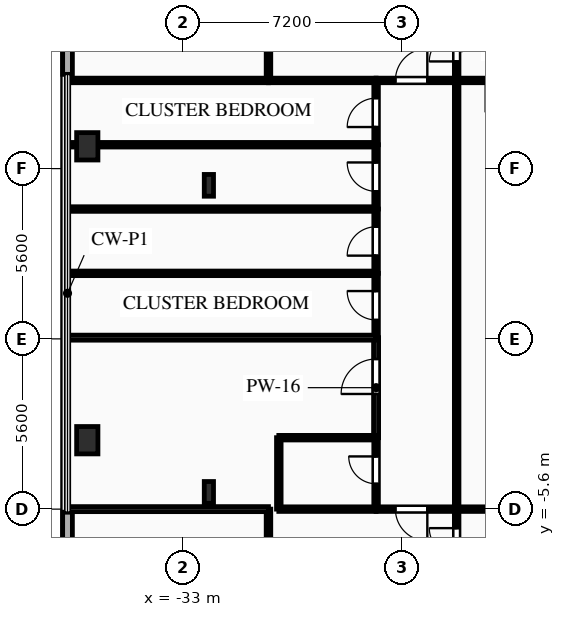
"""IFC4 building model, lengths in metres.
Left out: names, types, materials, properties, quantities, classifications, styles, units other than length and angle.
Written with IfcOpenShell. Run it as: python <this file> out.ifc"""

import sys

from ifc_helpers import new_model, si_unit, direction, frame, frame_2d, origin, origin_2d, place, context, subcontext, project, spatial, rectangle, i_section, extrude, element, fill, save


model = new_model("IFC4")
c1 = context("Model", 3, precision=1e-05, world=origin(), true_north=direction((0.0, 1.0)))
c2 = subcontext(c1, "Body", "Model", "MODEL_VIEW")
j1 = project(units=[si_unit("LENGTHUNIT", "METRE"), si_unit("PLANEANGLEUNIT", "RADIAN")], contexts=[c1])
p1 = place(None, origin())
s1 = spatial("IfcSite", under=j1, at=p1, CompositionType="ELEMENT")
p2 = place(p1, origin())
s2 = spatial("IfcBuilding", under=s1, at=p2, CompositionType="ELEMENT")
p3 = place(p2, frame((0.0, 0.0, 18.0)))
s3 = spatial("IfcBuildingStorey", under=s2, at=p3, CompositionType="ELEMENT", Elevation=18.0)
for number, where, z_axis, x_axis in (
    (1, (-36.15, -3.333, 0.0), (0.0, 0.0, 1.0), (1.0, 0.0, 0.0)),
    (2, (-36.15, 6.333, 0.0), (0.0, 0.0, 1.0), (1.0, 0.0, 0.0)),
):
    element("IfcColumn", number, at=place(p3, frame(where, z_axis=z_axis, x_axis=x_axis)), inside=s3, PredefinedType="COLUMN", context=c2, shape_type="SweptSolid", body=[
        extrude(rectangle(XDim=0.7, YDim=0.9, at=origin_2d()), origin(), (0.0, 0.0, 1.0), 4.5),
    ])
for number, where, z_axis, x_axis in (
    (3, (-32.15, 5.05, 0.0), (0.0, 0.0, 1.0), (1.0, 0.0, 0.0)),
    (4, (-32.15, -5.05, 0.0), (0.0, 0.0, 1.0), (1.0, 0.0, 0.0)),
):
    element("IfcColumn", number, at=place(p3, frame(where, z_axis=z_axis, x_axis=x_axis)), inside=s3, PredefinedType="COLUMN", context=c2, shape_type="SweptSolid", body=[
        extrude(i_section(OverallWidth=0.304, OverallDepth=0.716, WebThickness=0.021, FlangeThickness=0.04, FilletRadius=0.027, at=origin_2d()), origin(), (0.0, 0.0, 1.0), 4.5),
    ])
p4 = place(p3, frame((-36.8, -21.8, 0.0), z_axis=(0.0, 0.0, 1.0), x_axis=(0.0, 1.0, 0.0)))
e5 = element("IfcWall", 5, at=p4, inside=s3, PredefinedType="SOLIDWALL", context=c2, shape_type="SweptSolid", body=[
    extrude(rectangle(XDim=16.1, YDim=0.32, at=frame_2d((8.05, 0.0))), origin(), (0.0, 0.0, 1.0), 4.17),
])
p5 = place(p4, frame((5.067, 0.0, 0.85)))
e6 = element("IfcOpeningElement", 6, at=p5, cuts=e5, PredefinedType="OPENING", context=c2, shape_type="SweptSolid", body=[
    extrude(rectangle(XDim=2.6, YDim=2.4, at=frame_2d((1.3, 1.2))), frame((0.0, 0.17, 0.0), z_axis=(0.0, -1.0, 0.0), x_axis=(1.0, 0.0, 0.0)), (0.0, 0.0, 1.0), 0.34),
])
p6 = place(p3, frame((-36.8, 8.7, 0.0), z_axis=(0.0, 0.0, 1.0), x_axis=(0.0, 1.0, 0.0)))
e7 = element("IfcWall", 7, at=p6, inside=s3, PredefinedType="SOLIDWALL", context=c2, shape_type="SweptSolid", body=[
    extrude(rectangle(XDim=16.1, YDim=0.32, at=frame_2d((8.05, 0.0))), origin(), (0.0, 0.0, 1.0), 4.17),
])
p7 = place(p6, frame((8.485, 0.0, 0.85)))
e8 = element("IfcOpeningElement", 8, at=p7, cuts=e7, PredefinedType="OPENING", context=c2, shape_type="SweptSolid", body=[
    extrude(rectangle(XDim=2.6, YDim=2.4, at=frame_2d((1.3, 1.2))), frame((0.0, 0.17, 0.0), z_axis=(0.0, -1.0, 0.0), x_axis=(1.0, 0.0, 0.0)), (0.0, 0.0, 1.0), 0.34),
])
p8 = place(p3, frame((-24.0, 8.5, 0.0), z_axis=(0.0, 0.0, 1.0), x_axis=(0.0, 1.0, 0.0)))
e9 = element("IfcWall", 9, at=p8, inside=s3, PredefinedType="PARTITIONING", context=c2, shape_type="SweptSolid", body=[
    extrude(rectangle(XDim=2.15, YDim=0.15, at=frame_2d((1.075, 0.0))), origin(), (0.0, 0.0, 1.0), 4.17),
])
p9 = place(p8, frame((0.625, 0.0, 0.0)))
e10 = element("IfcOpeningElement", 10, at=p9, cuts=e9, PredefinedType="OPENING", context=c2, shape_type="SweptSolid", body=[
    extrude(rectangle(XDim=0.9, YDim=2.1, at=frame_2d((0.45, 1.05))), frame((0.0, 0.085, 0.0), z_axis=(0.0, -1.0, 0.0), x_axis=(1.0, 0.0, 0.0)), (0.0, 0.0, 1.0), 0.17),
])
p10 = place(p3, frame((-18.8, 8.5, 0.0), z_axis=(0.0, 0.0, 1.0), x_axis=(-1.0, 0.0, 0.0)))
e11 = element("IfcWall", 11, at=p10, inside=s3, PredefinedType="PARTITIONING", context=c2, shape_type="SweptSolid", body=[
    extrude(rectangle(XDim=5.2, YDim=0.15, at=frame_2d((2.6, 0.0))), origin(), (0.0, 0.0, 1.0), 4.17),
])
p11 = place(p10, frame((3.196, 0.0, 0.0)))
e12 = element("IfcOpeningElement", 12, at=p11, cuts=e11, PredefinedType="OPENING", context=c2, shape_type="SweptSolid", body=[
    extrude(rectangle(XDim=1.05, YDim=2.15, at=frame_2d((0.525, 1.075))), frame((0.0, 0.085, 0.0), z_axis=(0.0, -1.0, 0.0), x_axis=(1.0, 0.0, 0.0)), (0.0, 0.0, 1.0), 0.17),
])
p12 = place(p3, frame((-24.0, -7.75, 0.0), z_axis=(0.0, 0.0, 1.0), x_axis=(0.0, 1.0, 0.0)))
e13 = element("IfcWall", 13, at=p12, inside=s3, PredefinedType="PARTITIONING", context=c2, shape_type="SweptSolid", body=[
    extrude(rectangle(XDim=2.15, YDim=0.15, at=frame_2d((1.075, 0.0))), origin(), (0.0, 0.0, 1.0), 4.17),
])
p13 = place(p12, frame((0.625, 0.0, 0.0)))
e14 = element("IfcOpeningElement", 14, at=p13, cuts=e13, PredefinedType="OPENING", context=c2, shape_type="SweptSolid", body=[
    extrude(rectangle(XDim=0.9, YDim=2.1, at=frame_2d((0.45, 1.05))), frame((0.0, 0.085, 0.0), z_axis=(0.0, -1.0, 0.0), x_axis=(1.0, 0.0, 0.0)), (0.0, 0.0, 1.0), 0.17),
])
p14 = place(p3, frame((-24.0, -5.6, 0.0), z_axis=(0.0, 0.0, 1.0), x_axis=(1.0, 0.0, 0.0)))
e15 = element("IfcWall", 15, at=p14, inside=s3, PredefinedType="PARTITIONING", context=c2, shape_type="SweptSolid", body=[
    extrude(rectangle(XDim=5.2, YDim=0.15, at=frame_2d((2.6, 0.0))), origin(), (0.0, 0.0, 1.0), 4.17),
])
p15 = place(p3, frame((-26.65, 8.5, 0.0), z_axis=(0.0, 0.0, 1.0), x_axis=(1.0, 0.0, 0.0)))
e16 = element("IfcWall", 16, at=p15, inside=s3, PredefinedType="PARTITIONING", context=c2, shape_type="SweptSolid", body=[
    extrude(rectangle(XDim=2.65, YDim=0.15, at=frame_2d((1.325, 0.0))), origin(), (0.0, 0.0, 1.0), 4.17),
])
p16 = place(p15, frame((0.635, 0.0, 0.0)))
e17 = element("IfcOpeningElement", 17, at=p16, cuts=e16, PredefinedType="OPENING", context=c2, shape_type="SweptSolid", body=[
    extrude(rectangle(XDim=1.05, YDim=2.15, at=frame_2d((0.525, 1.075))), frame((0.0, 0.085, 0.0), z_axis=(0.0, -1.0, 0.0), x_axis=(1.0, 0.0, 0.0)), (0.0, 0.0, 1.0), 0.17),
])
p17 = place(p3, frame((-24.0, -5.6, 0.0), z_axis=(0.0, 0.0, 1.0), x_axis=(-1.0, 0.0, 0.0)))
e18 = element("IfcWall", 18, at=p17, inside=s3, PredefinedType="PARTITIONING", context=c2, shape_type="SweptSolid", body=[
    extrude(rectangle(XDim=2.65, YDim=0.15, at=frame_2d((1.325, 0.0))), origin(), (0.0, 0.0, 1.0), 4.17),
])
p18 = place(p17, frame((0.965, 0.0, 0.0)))
e19 = element("IfcOpeningElement", 19, at=p18, cuts=e18, PredefinedType="OPENING", context=c2, shape_type="SweptSolid", body=[
    extrude(rectangle(XDim=1.05, YDim=2.15, at=frame_2d((0.525, 1.075))), frame((0.0, 0.085, 0.0), z_axis=(0.0, -1.0, 0.0), x_axis=(1.0, 0.0, 0.0)), (0.0, 0.0, 1.0), 0.17),
])
p19 = place(p3, frame((-26.65, -5.6, 0.0), z_axis=(0.0, 0.0, 1.0), x_axis=(0.0, 1.0, 0.0)))
e20 = element("IfcWall", 20, at=p19, inside=s3, PredefinedType="PLUMBINGWALL", context=c2, shape_type="SweptSolid", body=[
    extrude(rectangle(XDim=2.35, YDim=0.15, at=frame_2d((1.175, 0.0))), origin(), (0.0, 0.0, 1.0), 4.17),
])
p20 = place(p19, frame((0.834, 0.0, 0.0)))
e21 = element("IfcOpeningElement", 21, at=p20, cuts=e20, PredefinedType="OPENING", context=c2, shape_type="SweptSolid", body=[
    extrude(rectangle(XDim=0.9, YDim=2.1, at=frame_2d((0.45, 1.05))), frame((0.0, 0.085, 0.0), z_axis=(0.0, -1.0, 0.0), x_axis=(1.0, 0.0, 0.0)), (0.0, 0.0, 1.0), 0.17),
])
p21 = place(p3, frame((-26.65, -3.25, 0.0), z_axis=(0.0, 0.0, 1.0), x_axis=(0.0, 1.0, 0.0)))
e22 = element("IfcWall", 22, at=p21, inside=s3, PredefinedType="PARTITIONING", context=c2, shape_type="SweptSolid", body=[
    extrude(rectangle(XDim=3.29, YDim=0.165, at=frame_2d((1.645, 0.0))), origin(), (0.0, 0.0, 1.0), 4.17),
])
p22 = place(p21, frame((1.438, 0.0, 0.0)))
e23 = element("IfcOpeningElement", 23, at=p22, cuts=e22, PredefinedType="OPENING", context=c2, shape_type="SweptSolid", body=[
    extrude(rectangle(XDim=1.15, YDim=2.15, at=frame_2d((0.575, 1.075))), frame((0.0, 0.093, 0.0), z_axis=(0.0, -1.0, 0.0), x_axis=(1.0, 0.0, 0.0)), (0.0, 0.0, 1.0), 0.185),
])
p23 = place(p3, frame((-26.65, 0.04, 0.0), z_axis=(0.0, 0.0, 1.0), x_axis=(0.0, 1.0, 0.0)))
e24 = element("IfcWall", 24, at=p23, inside=s3, PredefinedType="PARTITIONING", context=c2, shape_type="SweptSolid", body=[
    extrude(rectangle(XDim=2.115, YDim=0.15, at=frame_2d((1.058, 0.0))), origin(), (0.0, 0.0, 1.0), 4.17),
])
p24 = place(p23, frame((0.583, 0.0, 0.0)))
e25 = element("IfcOpeningElement", 25, at=p24, cuts=e24, PredefinedType="OPENING", context=c2, shape_type="SweptSolid", body=[
    extrude(rectangle(XDim=0.95, YDim=2.1, at=frame_2d((0.475, 1.05))), frame((0.0, 0.085, 0.0), z_axis=(0.0, -1.0, 0.0), x_axis=(1.0, 0.0, 0.0)), (0.0, 0.0, 1.0), 0.17),
])
p25 = place(p3, frame((-26.65, 2.155, 0.0), z_axis=(0.0, 0.0, 1.0), x_axis=(0.0, 1.0, 0.0)))
e26 = element("IfcWall", 26, at=p25, inside=s3, PredefinedType="PARTITIONING", context=c2, shape_type="SweptSolid", body=[
    extrude(rectangle(XDim=2.115, YDim=0.15, at=frame_2d((1.058, 0.0))), origin(), (0.0, 0.0, 1.0), 4.17),
])
p26 = place(p25, frame((0.583, 0.0, 0.0)))
e27 = element("IfcOpeningElement", 27, at=p26, cuts=e26, PredefinedType="OPENING", context=c2, shape_type="SweptSolid", body=[
    extrude(rectangle(XDim=0.95, YDim=2.1, at=frame_2d((0.475, 1.05))), frame((0.0, 0.085, 0.0), z_axis=(0.0, -1.0, 0.0), x_axis=(1.0, 0.0, 0.0)), (0.0, 0.0, 1.0), 0.17),
])
p27 = place(p3, frame((-26.65, 4.27, 0.0), z_axis=(0.0, 0.0, 1.0), x_axis=(0.0, 1.0, 0.0)))
e28 = element("IfcWall", 28, at=p27, inside=s3, PredefinedType="PARTITIONING", context=c2, shape_type="SweptSolid", body=[
    extrude(rectangle(XDim=2.115, YDim=0.15, at=frame_2d((1.058, 0.0))), origin(), (0.0, 0.0, 1.0), 4.17),
])
p28 = place(p27, frame((0.583, 0.0, 0.0)))
e29 = element("IfcOpeningElement", 29, at=p28, cuts=e28, PredefinedType="OPENING", context=c2, shape_type="SweptSolid", body=[
    extrude(rectangle(XDim=0.95, YDim=2.1, at=frame_2d((0.475, 1.05))), frame((0.0, 0.085, 0.0), z_axis=(0.0, -1.0, 0.0), x_axis=(1.0, 0.0, 0.0)), (0.0, 0.0, 1.0), 0.17),
])
p29 = place(p3, frame((-26.65, 6.385, 0.0), z_axis=(0.0, 0.0, 1.0), x_axis=(0.0, 1.0, 0.0)))
e30 = element("IfcWall", 30, at=p29, inside=s3, PredefinedType="PARTITIONING", context=c2, shape_type="SweptSolid", body=[
    extrude(rectangle(XDim=2.115, YDim=0.15, at=frame_2d((1.058, 0.0))), origin(), (0.0, 0.0, 1.0), 4.17),
])
p30 = place(p29, frame((0.583, 0.0, 0.0)))
e31 = element("IfcOpeningElement", 31, at=p30, cuts=e30, PredefinedType="OPENING", context=c2, shape_type="SweptSolid", body=[
    extrude(rectangle(XDim=0.95, YDim=2.1, at=frame_2d((0.475, 1.05))), frame((0.0, 0.085, 0.0), z_axis=(0.0, -1.0, 0.0), x_axis=(1.0, 0.0, 0.0)), (0.0, 0.0, 1.0), 0.17),
])
p31 = place(p3, frame((-24.0, 8.5, 0.0), z_axis=(0.0, 0.0, 1.0), x_axis=(0.0, -1.0, 0.0)))
e32 = element("IfcWall", 32, at=p31, inside=s3, PredefinedType="PARTITIONING", context=c2, shape_type="SweptSolid", body=[
    extrude(rectangle(XDim=14.1, YDim=0.15, at=frame_2d((7.05, 0.0))), origin(), (0.0, 0.0, 1.0), 4.17),
])
p32 = place(p3, frame((-30.19, 8.5, 0.0), z_axis=(0.0, 0.0, 1.0), x_axis=(0.0, 1.0, 0.0)))
e33 = element("IfcWall", 33, at=p32, inside=s3, PredefinedType="PARTITIONING", context=c2, shape_type="SweptSolid", body=[
    extrude(rectangle(XDim=16.3, YDim=0.15, at=frame_2d((8.15, 0.0))), origin(), (0.0, 0.0, 1.0), 4.17),
])
p33 = place(p32, frame((2.341, 0.0, 0.0)))
e34 = element("IfcOpeningElement", 34, at=p33, cuts=e33, PredefinedType="OPENING", context=c2, shape_type="SweptSolid", body=[
    extrude(rectangle(XDim=1.05, YDim=2.15, at=frame_2d((0.525, 1.075))), frame((0.0, 0.085, 0.0), z_axis=(0.0, -1.0, 0.0), x_axis=(1.0, 0.0, 0.0)), (0.0, 0.0, 1.0), 0.17),
])
p34 = place(p3, frame((-26.65, 8.5, 0.0), z_axis=(0.0, 0.0, 1.0), x_axis=(-1.0, 0.0, 0.0)))
e35 = element("IfcWall", 35, at=p34, inside=s3, PredefinedType="PARTITIONING", context=c2, shape_type="SweptSolid", body=[
    extrude(rectangle(XDim=3.54, YDim=0.15, at=frame_2d((1.77, 0.0))), origin(), (0.0, 0.0, 1.0), 4.17),
])
p35 = place(p3, frame((-30.19, 8.5, 0.0), z_axis=(0.0, 0.0, 1.0), x_axis=(-1.0, 0.0, 0.0)))
e36 = element("IfcWall", 36, at=p35, inside=s3, PredefinedType="PARTITIONING", context=c2, shape_type="SweptSolid", body=[
    extrude(rectangle(XDim=6.61, YDim=0.15, at=frame_2d((3.305, 0.0))), origin(), (0.0, 0.0, 1.0), 4.17),
])
p36 = place(p3, frame((-30.19, -21.8, 0.0), z_axis=(0.0, 0.0, 1.0), x_axis=(0.0, 1.0, 0.0)))
e37 = element("IfcWall", 37, at=p36, inside=s3, PredefinedType="PARTITIONING", context=c2, shape_type="SweptSolid", body=[
    extrude(rectangle(XDim=16.2, YDim=0.15, at=frame_2d((8.1, 0.0))), origin(), (0.0, 0.0, 1.0), 4.17),
])
p37 = place(p36, frame((11.073, 0.0, 0.0)))
e38 = element("IfcOpeningElement", 38, at=p37, cuts=e37, PredefinedType="OPENING", context=c2, shape_type="SweptSolid", body=[
    extrude(rectangle(XDim=1.05, YDim=2.15, at=frame_2d((0.525, 1.075))), frame((0.0, 0.085, 0.0), z_axis=(0.0, -1.0, 0.0), x_axis=(1.0, 0.0, 0.0)), (0.0, 0.0, 1.0), 0.17),
])
p38 = place(p3, frame((-29.85, -5.6, 0.0), z_axis=(0.0, 0.0, 1.0), x_axis=(1.0, 0.0, 0.0)))
e39 = element("IfcWall", 39, at=p38, inside=s3, PredefinedType="PLUMBINGWALL", context=c2, shape_type="SweptSolid", body=[
    extrude(rectangle(XDim=3.2, YDim=0.15, at=frame_2d((1.6, 0.0))), origin(), (0.0, 0.0, 1.0), 4.17),
])
p39 = place(p3, frame((-36.8, -5.6, 0.0), z_axis=(0.0, 0.0, 1.0), x_axis=(1.0, 0.0, 0.0)))
e40 = element("IfcWall", 40, at=p39, inside=s3, PredefinedType="PARTITIONING", context=c2, shape_type="SweptSolid", body=[
    extrude(rectangle(XDim=6.61, YDim=0.165, at=frame_2d((3.305, 0.0))), origin(), (0.0, 0.0, 1.0), 4.17),
])
p40 = place(p3, frame((-29.85, -3.25, 0.0), z_axis=(0.0, 0.0, 1.0), x_axis=(1.0, 0.0, 0.0)))
e41 = element("IfcWall", 41, at=p40, inside=s3, PredefinedType="PLUMBINGWALL", context=c2, shape_type="SweptSolid", body=[
    extrude(rectangle(XDim=3.2, YDim=0.15, at=frame_2d((1.6, 0.0))), origin(), (0.0, 0.0, 1.0), 4.17),
])
p41 = place(p3, frame((-29.85, -5.6, 0.0), z_axis=(0.0, 0.0, 1.0), x_axis=(0.0, 1.0, 0.0)))
e42 = element("IfcWall", 42, at=p41, inside=s3, PredefinedType="PLUMBINGWALL", context=c2, shape_type="SweptSolid", body=[
    extrude(rectangle(XDim=2.35, YDim=0.15, at=frame_2d((1.175, 0.0))), origin(), (0.0, 0.0, 1.0), 4.17),
])
p42 = place(p3, frame((-36.8, 0.04, 0.0), z_axis=(0.0, 0.0, 1.0), x_axis=(1.0, 0.0, 0.0)))
e43 = element("IfcWall", 43, at=p42, inside=s3, PredefinedType="PARTITIONING", context=c2, shape_type="SweptSolid", body=[
    extrude(rectangle(XDim=10.15, YDim=0.165, at=frame_2d((5.075, 0.0))), origin(), (0.0, 0.0, 1.0), 4.17),
])
p43 = place(p3, frame((-36.8, 2.155, 0.0), z_axis=(0.0, 0.0, 1.0), x_axis=(1.0, 0.0, 0.0)))
e44 = element("IfcWall", 44, at=p43, inside=s3, PredefinedType="PARTITIONING", context=c2, shape_type="SweptSolid", body=[
    extrude(rectangle(XDim=10.15, YDim=0.15, at=frame_2d((5.075, 0.0))), origin(), (0.0, 0.0, 1.0), 4.17),
])
p44 = place(p3, frame((-36.8, 4.27, 0.0), z_axis=(0.0, 0.0, 1.0), x_axis=(1.0, 0.0, 0.0)))
e45 = element("IfcWall", 45, at=p44, inside=s3, PredefinedType="PARTITIONING", context=c2, shape_type="SweptSolid", body=[
    extrude(rectangle(XDim=10.15, YDim=0.15, at=frame_2d((5.075, 0.0))), origin(), (0.0, 0.0, 1.0), 3.655),
])
p45 = place(p3, frame((-36.8, 6.385, 0.0), z_axis=(0.0, 0.0, 1.0), x_axis=(1.0, 0.0, 0.0)))
e46 = element("IfcWall", 46, at=p45, inside=s3, PredefinedType="PARTITIONING", context=c2, shape_type="SweptSolid", body=[
    extrude(rectangle(XDim=10.15, YDim=0.15, at=frame_2d((5.075, 0.0))), origin(), (0.0, 0.0, 1.0), 3.555),
])
p46 = place(p9, origin())
e47 = element("IfcDoor", 47, at=p46, inside=s3, OperationType="SINGLE_SWING_LEFT", PredefinedType="DOOR", context=c2, shape_type="SweptSolid", body=[
    extrude(rectangle(XDim=0.9, YDim=2.1, at=frame_2d((0.45, 1.05))), frame((0.0, 0.025, 0.0), z_axis=(0.0, -1.0, 0.0), x_axis=(1.0, 0.0, 0.0)), (0.0, 0.0, 1.0), 0.05),
])
fill(e10, e47)
p47 = place(p13, origin())
e48 = element("IfcDoor", 48, at=p47, inside=s3, OperationType="SINGLE_SWING_RIGHT", PredefinedType="DOOR", context=c2, shape_type="SweptSolid", body=[
    extrude(rectangle(XDim=0.9, YDim=2.1, at=frame_2d((0.45, 1.05))), frame((0.0, 0.025, 0.0), z_axis=(0.0, -1.0, 0.0), x_axis=(1.0, 0.0, 0.0)), (0.0, 0.0, 1.0), 0.05),
])
fill(e14, e48)
p48 = place(p16, origin())
e49 = element("IfcDoor", 49, at=p48, inside=s3, OperationType="SINGLE_SWING_RIGHT", PredefinedType="DOOR", context=c2, shape_type="SweptSolid", body=[
    extrude(rectangle(XDim=1.05, YDim=2.15, at=frame_2d((0.525, 1.075))), frame((0.0, 0.025, 0.0), z_axis=(0.0, -1.0, 0.0), x_axis=(1.0, 0.0, 0.0)), (0.0, 0.0, 1.0), 0.05),
])
fill(e17, e49)
p49 = place(p18, origin())
e50 = element("IfcDoor", 50, at=p49, inside=s3, OperationType="SINGLE_SWING_LEFT", PredefinedType="DOOR", context=c2, shape_type="SweptSolid", body=[
    extrude(rectangle(XDim=1.05, YDim=2.15, at=frame_2d((0.525, 1.075))), frame((0.0, 0.025, 0.0), z_axis=(0.0, -1.0, 0.0), x_axis=(1.0, 0.0, 0.0)), (0.0, 0.0, 1.0), 0.05),
])
fill(e19, e50)
p50 = place(p20, origin())
e51 = element("IfcDoor", 51, at=p50, inside=s3, OperationType="SINGLE_SWING_RIGHT", PredefinedType="DOOR", context=c2, shape_type="SweptSolid", body=[
    extrude(rectangle(XDim=0.9, YDim=2.1, at=frame_2d((0.45, 1.05))), frame((0.0, 0.025, 0.0), z_axis=(0.0, -1.0, 0.0), x_axis=(1.0, 0.0, 0.0)), (0.0, 0.0, 1.0), 0.05),
])
fill(e21, e51)
p51 = place(p22, origin())
e52 = element("IfcDoor", 52, at=p51, inside=s3, OperationType="SINGLE_SWING_LEFT", PredefinedType="DOOR", context=c2, shape_type="SweptSolid", body=[
    extrude(rectangle(XDim=1.15, YDim=2.15, at=frame_2d((0.575, 1.075))), frame((0.0, 0.025, 0.0), z_axis=(0.0, -1.0, 0.0), x_axis=(1.0, 0.0, 0.0)), (0.0, 0.0, 1.0), 0.05),
])
fill(e23, e52)
p52 = place(p24, origin())
e53 = element("IfcDoor", 53, at=p52, inside=s3, OperationType="SINGLE_SWING_RIGHT", PredefinedType="DOOR", context=c2, shape_type="SweptSolid", body=[
    extrude(rectangle(XDim=0.95, YDim=2.1, at=frame_2d((0.475, 1.05))), frame((0.0, 0.025, 0.0), z_axis=(0.0, -1.0, 0.0), x_axis=(1.0, 0.0, 0.0)), (0.0, 0.0, 1.0), 0.05),
])
fill(e25, e53)
p53 = place(p26, origin())
e54 = element("IfcDoor", 54, at=p53, inside=s3, OperationType="SINGLE_SWING_LEFT", PredefinedType="DOOR", context=c2, shape_type="SweptSolid", body=[
    extrude(rectangle(XDim=0.95, YDim=2.1, at=frame_2d((0.475, 1.05))), frame((0.0, 0.025, 0.0), z_axis=(0.0, -1.0, 0.0), x_axis=(1.0, 0.0, 0.0)), (0.0, 0.0, 1.0), 0.05),
])
fill(e27, e54)
p54 = place(p28, origin())
e55 = element("IfcDoor", 55, at=p54, inside=s3, OperationType="SINGLE_SWING_RIGHT", PredefinedType="DOOR", context=c2, shape_type="SweptSolid", body=[
    extrude(rectangle(XDim=0.95, YDim=2.1, at=frame_2d((0.475, 1.05))), frame((0.0, 0.025, 0.0), z_axis=(0.0, -1.0, 0.0), x_axis=(1.0, 0.0, 0.0)), (0.0, 0.0, 1.0), 0.05),
])
fill(e29, e55)
p55 = place(p30, origin())
e56 = element("IfcDoor", 56, at=p55, inside=s3, OperationType="SINGLE_SWING_LEFT", PredefinedType="DOOR", context=c2, shape_type="SweptSolid", body=[
    extrude(rectangle(XDim=0.95, YDim=2.1, at=frame_2d((0.475, 1.05))), frame((0.0, 0.025, 0.0), z_axis=(0.0, -1.0, 0.0), x_axis=(1.0, 0.0, 0.0)), (0.0, 0.0, 1.0), 0.05),
])
fill(e31, e56)
save(model, sys.argv[1])
